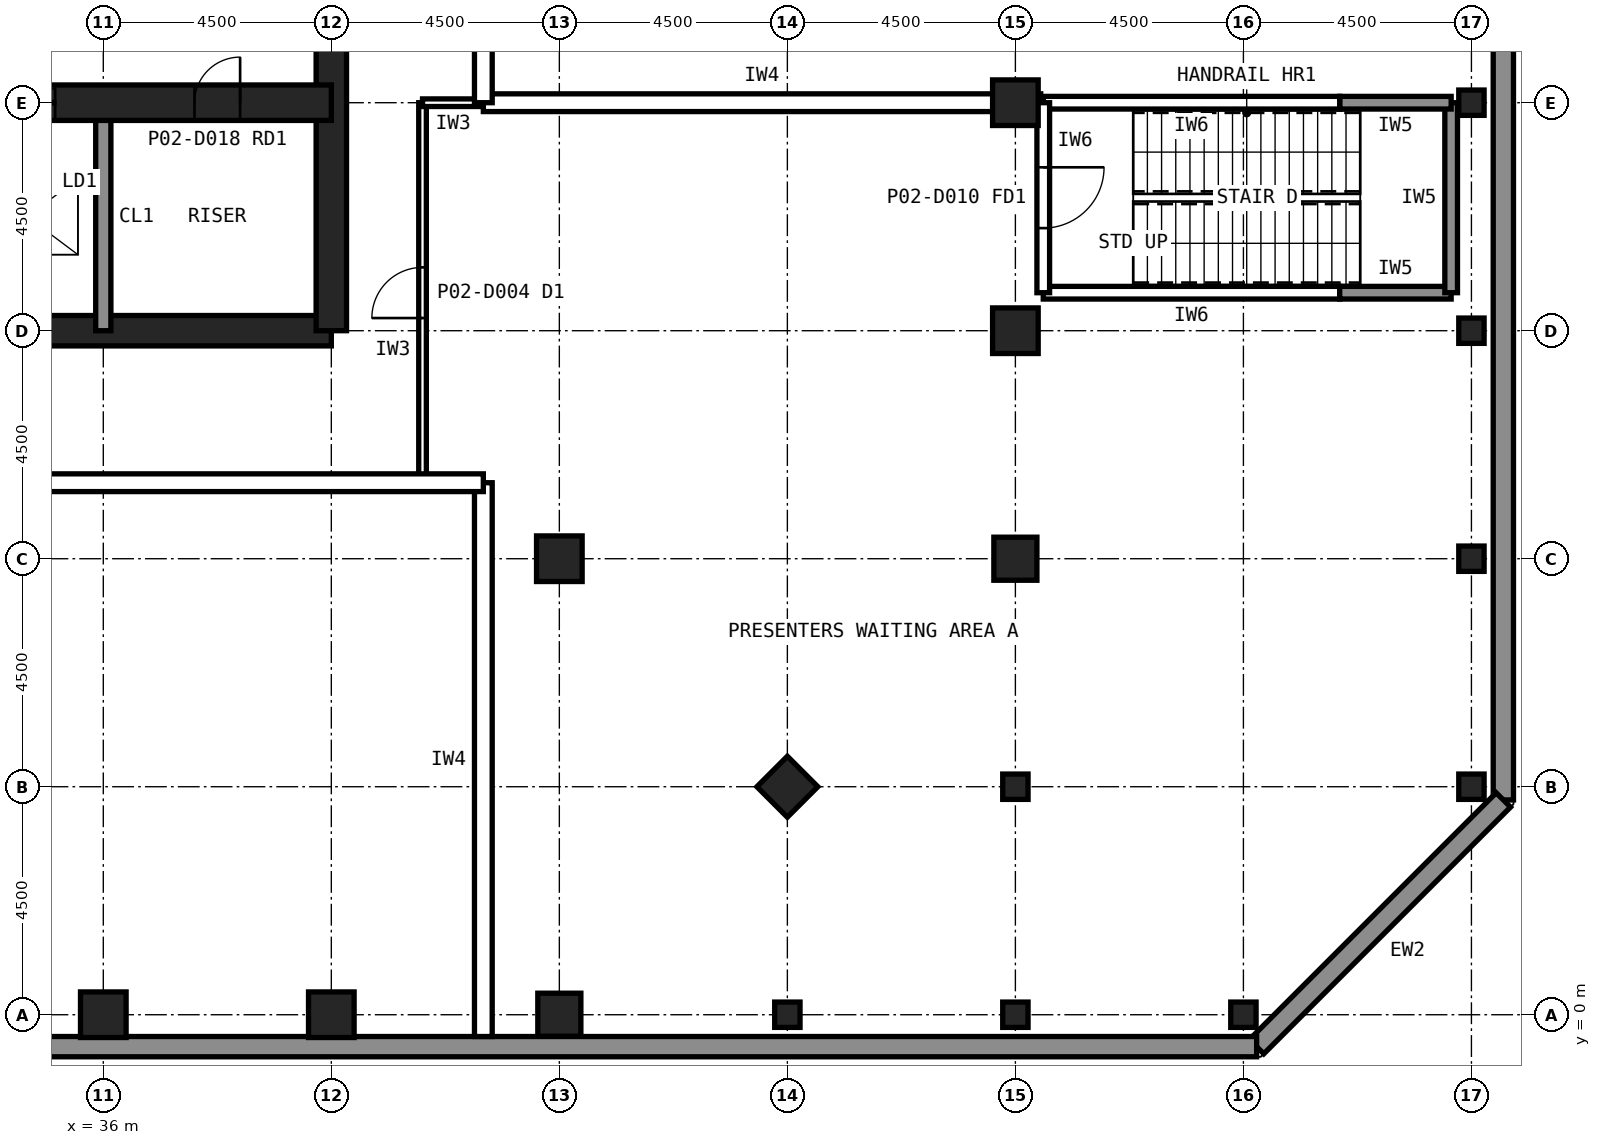
"""IFC4 building model, lengths in metres.
Left out: names, types, materials, properties, quantities, classifications, styles, units other than length and angle.
Written with IfcOpenShell. Run it as: python <this file> out.ifc"""

import sys

from ifc_helpers import new_model, si_unit, direction, frame, frame_2d, origin, origin_2d, place, context, subcontext, project, spatial, rectangle, hollow_rectangle, extrude, element, fill, save


model = new_model("IFC4")
c1 = context("Model", 3, precision=1e-05, world=origin(), true_north=direction((0.0, 1.0)))
c2 = subcontext(c1, "Body", "Model", "MODEL_VIEW")
j1 = project(units=[si_unit("LENGTHUNIT", "METRE"), si_unit("PLANEANGLEUNIT", "RADIAN")], contexts=[c1])
p1 = place(None, origin())
s1 = spatial("IfcSite", under=j1, at=p1, CompositionType="ELEMENT")
p2 = place(p1, origin())
s2 = spatial("IfcBuilding", under=s1, at=p2, CompositionType="ELEMENT")
p3 = place(p2, frame((0.0, 0.0, 6.0)))
s3 = spatial("IfcBuildingStorey", under=s2, at=p3, CompositionType="ELEMENT", Elevation=6.0)
for number, where, z_axis, x_axis in (
    (1, (36.0, 0.0, 0.0), (0.0, 0.0, 1.0), (1.0, 0.0, 0.0)),
    (2, (40.5, 0.0, 0.0), (0.0, 0.0, 1.0), (1.0, 0.0, 0.0)),
):
    element("IfcColumn", number, at=place(p3, frame(where, z_axis=z_axis, x_axis=x_axis)), inside=s3, PredefinedType="COLUMN", context=c2, shape_type="SweptSolid", body=[
        extrude(hollow_rectangle(XDim=0.9, YDim=0.9, WallThickness=0.063, at=origin_2d()), origin(), (0.0, 0.0, 1.0), 6.0),
    ])
for number, where, z_axis, x_axis in (
    (3, (45.0, 0.0, 0.0), (0.0, 0.0, 1.0), (1.0, 0.0, 0.0)),
    (4, (54.0, 9.0, 0.0), (0.0, 0.0, 1.0), (1.0, 0.0, 0.0)),
):
    element("IfcColumn", number, at=place(p3, frame(where, z_axis=z_axis, x_axis=x_axis)), inside=s3, PredefinedType="COLUMN", context=c2, shape_type="SweptSolid", body=[
        extrude(hollow_rectangle(XDim=0.85, YDim=0.85, WallThickness=0.05, at=origin_2d()), origin(), (0.0, 0.0, 1.0), 6.0),
    ])
for number, where, z_axis, x_axis in (
    (5, (54.0, 13.5, 0.0), (0.0, 0.0, 1.0), (1.0, 0.0, 0.0)),
    (6, (54.0, 18.0, 0.0), (0.0, 0.0, 1.0), (1.0, 0.0, 0.0)),
):
    element("IfcColumn", number, at=place(p3, frame(where, z_axis=z_axis, x_axis=x_axis)), inside=s3, PredefinedType="COLUMN", context=c2, shape_type="SweptSolid", body=[
        extrude(hollow_rectangle(XDim=0.9, YDim=0.9, WallThickness=0.063, at=origin_2d()), origin(), (0.0, 0.0, 1.0), 6.0),
    ])
p4 = place(p3, frame((49.5, 4.5, 0.0), z_axis=(0.0, 0.0, 1.0), x_axis=(0.707106781187, 0.707106781187, 0.0)))
e7 = element("IfcColumn", 7, at=p4, inside=s3, PredefinedType="COLUMN", context=c2, shape_type="SweptSolid", body=[
    extrude(hollow_rectangle(XDim=0.85, YDim=0.85, WallThickness=0.05, at=origin_2d()), origin(), (0.0, 0.0, 1.0), 6.0),
])
p5 = place(p3, frame((45.0, 9.0, 0.0), z_axis=(0.0, 0.0, 1.0), x_axis=(1.0, 0.0, 0.0)))
e8 = element("IfcColumn", 8, at=p5, inside=s3, PredefinedType="COLUMN", context=c2, shape_type="SweptSolid", body=[
    extrude(hollow_rectangle(XDim=0.9, YDim=0.9, WallThickness=0.063, at=origin_2d()), origin(), (0.0, 0.0, 1.0), 6.0),
])
for number, where, z_axis, x_axis in (
    (9, (63.0, 4.5, 0.0), (0.0, 0.0, 1.0), (1.0, 0.0, 0.0)),
    (10, (63.0, 9.0, 0.0), (0.0, 0.0, 1.0), (1.0, 0.0, 0.0)),
    (11, (63.0, 13.5, 0.0), (0.0, 0.0, 1.0), (1.0, 0.0, 0.0)),
    (12, (63.0, 18.0, 0.0), (0.0, 0.0, 1.0), (1.0, 0.0, 0.0)),
    (13, (58.5, 0.0, 0.0), (0.0, 0.0, 1.0), (1.0, 0.0, 0.0)),
    (14, (54.0, 0.0, 0.0), (0.0, 0.0, 1.0), (1.0, 0.0, 0.0)),
    (15, (49.5, 0.0, 0.0), (0.0, 0.0, 1.0), (1.0, 0.0, 0.0)),
    (16, (54.0, 4.5, 0.0), (0.0, 0.0, 1.0), (1.0, 0.0, 0.0)),
):
    element("IfcColumn", number, at=place(p3, frame(where, z_axis=z_axis, x_axis=x_axis)), inside=s3, PredefinedType="COLUMN", context=c2, shape_type="SweptSolid", body=[
        extrude(hollow_rectangle(XDim=0.5, YDim=0.5, WallThickness=0.022, at=origin_2d()), origin(), (0.0, 0.0, 1.0), 6.0),
    ])
p6 = place(p3, frame((13.5, 13.5, 0.0), z_axis=(0.0, 0.0, 1.0), x_axis=(1.0, 0.0, 0.0)))
e17 = element("IfcWall", 17, at=p6, inside=s3, PredefinedType="SHEAR", context=c2, shape_type="SweptSolid", body=[
    extrude(rectangle(XDim=27.0, YDim=0.6, at=frame_2d((13.5, 0.0))), origin(), (0.0, 0.0, 1.0), 6.0),
])
p7 = place(p3, frame((40.5, 13.5, 0.0), z_axis=(0.0, 0.0, 1.0), x_axis=(0.0, 1.0, 0.0)))
e18 = element("IfcWall", 18, at=p7, inside=s3, PredefinedType="SHEAR", context=c2, shape_type="SweptSolid", body=[
    extrude(rectangle(XDim=27.0, YDim=0.6, at=frame_2d((13.5, 0.0))), origin(), (0.0, 0.0, 1.0), 6.0),
])
p8 = place(p7, frame((5.85, 0.0, 0.0)))
e19 = element("IfcOpeningElement", 19, at=p8, cuts=e18, PredefinedType="OPENING", context=c2, shape_type="SweptSolid", body=[
    extrude(rectangle(XDim=1.8, YDim=2.1, at=frame_2d((0.9, 1.05))), frame((0.0, 0.31, 0.0), z_axis=(0.0, -1.0, 0.0), x_axis=(1.0, 0.0, 0.0)), (0.0, 0.0, 1.0), 0.62),
])
p9 = place(p7, frame((19.65, 0.0, 0.0)))
e20 = element("IfcOpeningElement", 20, at=p9, cuts=e18, PredefinedType="OPENING", context=c2, shape_type="SweptSolid", body=[
    extrude(rectangle(XDim=1.2, YDim=2.1, at=frame_2d((0.6, 1.05))), frame((0.0, 0.31, 0.0), z_axis=(0.0, -1.0, 0.0), x_axis=(1.0, 0.0, 0.0)), (0.0, 0.0, 1.0), 0.62),
])
p10 = place(p3, frame((36.0, 13.5, 0.0), z_axis=(0.0, 0.0, 1.0), x_axis=(0.0, 1.0, 0.0)))
e21 = element("IfcWall", 21, at=p10, inside=s3, PredefinedType="SOLIDWALL", context=c2, shape_type="SweptSolid", body=[
    extrude(rectangle(XDim=4.5, YDim=0.3, at=frame_2d((2.25, 0.0))), origin(), (0.0, 0.0, 1.0), 5.8),
])
p11 = place(p3, frame((13.5, 18.0, 0.0), z_axis=(0.0, 0.0, 1.0), x_axis=(1.0, 0.0, 0.0)))
e22 = element("IfcWall", 22, at=p11, inside=s3, PredefinedType="SHEAR", context=c2, shape_type="SweptSolid", body=[
    extrude(rectangle(XDim=27.0, YDim=0.7, at=frame_2d((13.5, 0.0))), origin(), (0.0, 0.0, 1.0), 6.0),
])
p12 = place(p11, frame((24.3, 0.0, 0.0)))
e23 = element("IfcOpeningElement", 23, at=p12, cuts=e22, PredefinedType="OPENING", context=c2, shape_type="SweptSolid", body=[
    extrude(rectangle(XDim=0.9, YDim=2.1, at=frame_2d((0.45, 1.05))), frame((0.0, 0.36, 0.0), z_axis=(0.0, -1.0, 0.0), x_axis=(1.0, 0.0, 0.0)), (0.0, 0.0, 1.0), 0.72),
])
p13 = place(p11, frame((5.45, 0.0, 0.0)))
e24 = element("IfcOpeningElement", 24, at=p13, cuts=e22, PredefinedType="OPENING", context=c2, shape_type="SweptSolid", body=[
    extrude(rectangle(XDim=1.1, YDim=2.1, at=frame_2d((0.55, 1.05))), frame((0.0, 0.36, 0.0), z_axis=(0.0, -1.0, 0.0), x_axis=(1.0, 0.0, 0.0)), (0.0, 0.0, 1.0), 0.72),
])
p14 = place(p11, frame((8.45, 0.0, 0.0)))
e25 = element("IfcOpeningElement", 25, at=p14, cuts=e22, PredefinedType="OPENING", context=c2, shape_type="SweptSolid", body=[
    extrude(rectangle(XDim=1.1, YDim=2.1, at=frame_2d((0.55, 1.05))), frame((0.0, 0.36, 0.0), z_axis=(0.0, -1.0, 0.0), x_axis=(1.0, 0.0, 0.0)), (0.0, 0.0, 1.0), 0.72),
])
p15 = place(p11, frame((11.45, 0.0, 0.0)))
e26 = element("IfcOpeningElement", 26, at=p15, cuts=e22, PredefinedType="OPENING", context=c2, shape_type="SweptSolid", body=[
    extrude(rectangle(XDim=1.1, YDim=2.1, at=frame_2d((0.55, 1.05))), frame((0.0, 0.36, 0.0), z_axis=(0.0, -1.0, 0.0), x_axis=(1.0, 0.0, 0.0)), (0.0, 0.0, 1.0), 0.72),
])
p16 = place(p11, frame((14.45, 0.0, 0.0)))
e27 = element("IfcOpeningElement", 27, at=p16, cuts=e22, PredefinedType="OPENING", context=c2, shape_type="SweptSolid", body=[
    extrude(rectangle(XDim=1.1, YDim=2.1, at=frame_2d((0.55, 1.05))), frame((0.0, 0.36, 0.0), z_axis=(0.0, -1.0, 0.0), x_axis=(1.0, 0.0, 0.0)), (0.0, 0.0, 1.0), 0.72),
])
p17 = place(p11, frame((17.45, 0.0, 0.0)))
e28 = element("IfcOpeningElement", 28, at=p17, cuts=e22, PredefinedType="OPENING", context=c2, shape_type="SweptSolid", body=[
    extrude(rectangle(XDim=1.1, YDim=2.1, at=frame_2d((0.55, 1.05))), frame((0.0, 0.36, 0.0), z_axis=(0.0, -1.0, 0.0), x_axis=(1.0, 0.0, 0.0)), (0.0, 0.0, 1.0), 0.72),
])
p18 = place(p11, frame((20.45, 0.0, 0.0)))
e29 = element("IfcOpeningElement", 29, at=p18, cuts=e22, PredefinedType="OPENING", context=c2, shape_type="SweptSolid", body=[
    extrude(rectangle(XDim=1.1, YDim=2.1, at=frame_2d((0.55, 1.05))), frame((0.0, 0.36, 0.0), z_axis=(0.0, -1.0, 0.0), x_axis=(1.0, 0.0, 0.0)), (0.0, 0.0, 1.0), 0.72),
])
p19 = place(p11, frame((1.6, 0.0, 0.0)))
e30 = element("IfcOpeningElement", 30, at=p19, cuts=e22, PredefinedType="OPENING", context=c2, shape_type="SweptSolid", body=[
    extrude(rectangle(XDim=1.3, YDim=2.2, at=frame_2d((0.65, 1.1))), frame((0.0, 0.36, 0.0), z_axis=(0.0, -1.0, 0.0), x_axis=(1.0, 0.0, 0.0)), (0.0, 0.0, 1.0), 0.72),
])
p20 = place(p3, frame((63.63, 49.761, 0.0), z_axis=(0.0, 0.0, 1.0), x_axis=(0.0, -1.0, 0.0)))
e31 = element("IfcWall", 31, at=p20, inside=s3, PredefinedType="SOLIDWALL", context=c2, shape_type="SweptSolid", body=[
    extrude(rectangle(XDim=45.522, YDim=0.4, at=frame_2d((22.761, 0.0))), origin(), (0.0, 0.0, 1.0), 6.0),
])
p21 = place(p3, frame((63.63, 4.239, 0.0), z_axis=(0.0, 0.0, 1.0), x_axis=(-0.707106781187, -0.707106781187, 0.0)))
e32 = element("IfcWall", 32, at=p21, inside=s3, PredefinedType="SOLIDWALL", context=c2, shape_type="SweptSolid", body=[
    extrude(rectangle(XDim=6.886, YDim=0.4, at=frame_2d((3.443, 0.0))), origin(), (0.0, 0.0, 1.0), 6.0),
])
p22 = place(p3, frame((58.761, -0.63, 0.0), z_axis=(0.0, 0.0, 1.0), x_axis=(-1.0, 0.0, 0.0)))
e33 = element("IfcWall", 33, at=p22, inside=s3, PredefinedType="SOLIDWALL", context=c2, shape_type="SweptSolid", body=[
    extrude(rectangle(XDim=63.522, YDim=0.4, at=frame_2d((31.761, 0.0))), origin(), (0.0, 0.0, 1.0), 6.0),
])
p23 = place(p3, frame((42.3, 10.5, 0.0), z_axis=(0.0, 0.0, 1.0), x_axis=(0.0, 1.0, 0.0)))
e34 = element("IfcWall", 34, at=p23, inside=s3, PredefinedType="PARTITIONING", context=c2, shape_type="SweptSolid", body=[
    extrude(rectangle(XDim=7.5, YDim=0.15, at=frame_2d((3.75, 0.0))), origin(), (0.0, 0.0, 1.0), 5.8),
])
p24 = place(p23, frame((3.25, 0.0, 0.0)))
e35 = element("IfcOpeningElement", 35, at=p24, cuts=e34, PredefinedType="OPENING", context=c2, shape_type="SweptSolid", body=[
    extrude(rectangle(XDim=1.0, YDim=2.1, at=frame_2d((0.5, 1.05))), frame((0.0, 0.085, 0.0), z_axis=(0.0, -1.0, 0.0), x_axis=(1.0, 0.0, 0.0)), (0.0, 0.0, 1.0), 0.17),
])
p25 = place(p3, frame((42.3, 18.0, 0.0), z_axis=(0.0, 0.0, 1.0), x_axis=(1.0, 0.0, 0.0)))
e36 = element("IfcWall", 36, at=p25, inside=s3, PredefinedType="PARTITIONING", context=c2, shape_type="SweptSolid", body=[
    extrude(rectangle(XDim=1.21, YDim=0.15, at=frame_2d((0.605, 0.0))), origin(), (0.0, 0.0, 1.0), 4.881),
])
p26 = place(p3, frame((43.5, -0.43, 0.0), z_axis=(0.0, 0.0, 1.0), x_axis=(0.0, 1.0, 0.0)))
e37 = element("IfcWall", 37, at=p26, inside=s3, PredefinedType="PARTITIONING", context=c2, shape_type="SweptSolid", body=[
    extrude(rectangle(XDim=10.93, YDim=0.35, at=frame_2d((5.465, 0.0))), origin(), (0.0, 0.0, 1.0), 5.8),
])
p27 = place(p3, frame((43.5, 10.5, 0.0), z_axis=(0.0, 0.0, 1.0), x_axis=(-1.0, 0.0, 0.0)))
e38 = element("IfcWall", 38, at=p27, inside=s3, PredefinedType="PARTITIONING", context=c2, shape_type="SweptSolid", body=[
    extrude(rectangle(XDim=33.0, YDim=0.35, at=frame_2d((16.5, 0.0))), origin(), (0.0, 0.0, 1.0), 5.8),
])
p28 = place(p27, frame((15.3, 0.0, 0.0)))
e39 = element("IfcOpeningElement", 39, at=p28, cuts=e38, PredefinedType="OPENING", context=c2, shape_type="SweptSolid", body=[
    extrude(rectangle(XDim=2.4, YDim=3.0, at=frame_2d((1.2, 1.5))), frame((0.0, 0.185, 0.0), z_axis=(0.0, -1.0, 0.0), x_axis=(1.0, 0.0, 0.0)), (0.0, 0.0, 1.0), 0.37),
])
p29 = place(p3, frame((43.5, 18.0, 0.0), z_axis=(0.0, 0.0, 1.0), x_axis=(1.0, 0.0, 0.0)))
e40 = element("IfcWall", 40, at=p29, inside=s3, PredefinedType="PARTITIONING", context=c2, shape_type="SweptSolid", body=[
    extrude(rectangle(XDim=11.0, YDim=0.35, at=frame_2d((5.5, 0.0))), origin(), (0.0, 0.0, 1.0), 4.881),
])
p30 = place(p3, frame((43.5, 36.0, 0.0), z_axis=(0.0, 0.0, 1.0), x_axis=(0.0, -1.0, 0.0)))
e41 = element("IfcWall", 41, at=p30, inside=s3, PredefinedType="PARTITIONING", context=c2, shape_type="SweptSolid", body=[
    extrude(rectangle(XDim=18.0, YDim=0.35, at=frame_2d((9.0, 0.0))), origin(), (0.0, 0.0, 1.0), 5.8),
])
p31 = place(p30, frame((7.8, 0.0, 0.0)))
e42 = element("IfcOpeningElement", 42, at=p31, cuts=e41, PredefinedType="OPENING", context=c2, shape_type="SweptSolid", body=[
    extrude(rectangle(XDim=2.4, YDim=3.0, at=frame_2d((1.2, 1.5))), frame((0.0, 0.185, 0.0), z_axis=(0.0, -1.0, 0.0), x_axis=(1.0, 0.0, 0.0)), (0.0, 0.0, 1.0), 0.37),
])
p32 = place(p3, frame((54.55, 14.25, 0.0), z_axis=(0.0, 0.0, 1.0), x_axis=(1.0, 0.0, 0.0)))
e43 = element("IfcWall", 43, at=p32, inside=s3, PredefinedType="PARTITIONING", context=c2, shape_type="SweptSolid", body=[
    extrude(rectangle(XDim=5.85, YDim=0.25, at=frame_2d((2.925, 0.0))), origin(), (0.0, 0.0, 1.0), 5.8),
])
p33 = place(p3, frame((60.4, 14.25, 0.0), z_axis=(0.0, 0.0, 1.0), x_axis=(1.0, 0.0, 0.0)))
e44 = element("IfcWall", 44, at=p33, inside=s3, PredefinedType="SOLIDWALL", context=c2, shape_type="SweptSolid", body=[
    extrude(rectangle(XDim=2.2, YDim=0.25, at=frame_2d((1.1, 0.0))), origin(), (0.0, 0.0, 1.0), 6.0),
])
p34 = place(p3, frame((62.6, 14.25, 0.0), z_axis=(0.0, 0.0, 1.0), x_axis=(0.0, 1.0, 0.0)))
e45 = element("IfcWall", 45, at=p34, inside=s3, PredefinedType="SOLIDWALL", context=c2, shape_type="SweptSolid", body=[
    extrude(rectangle(XDim=3.75, YDim=0.25, at=frame_2d((1.875, 0.0))), origin(), (0.0, 0.0, 1.0), 6.0),
])
p35 = place(p3, frame((62.6, 18.0, 0.0), z_axis=(0.0, 0.0, 1.0), x_axis=(-1.0, 0.0, 0.0)))
e46 = element("IfcWall", 46, at=p35, inside=s3, PredefinedType="SOLIDWALL", context=c2, shape_type="SweptSolid", body=[
    extrude(rectangle(XDim=2.2, YDim=0.25, at=frame_2d((1.1, 0.0))), origin(), (0.0, 0.0, 1.0), 5.189),
])
p36 = place(p3, frame((60.4, 18.0, 0.0), z_axis=(0.0, 0.0, 1.0), x_axis=(-1.0, 0.0, 0.0)))
e47 = element("IfcWall", 47, at=p36, inside=s3, PredefinedType="PARTITIONING", context=c2, shape_type="SweptSolid", body=[
    extrude(rectangle(XDim=5.85, YDim=0.25, at=frame_2d((2.925, 0.0))), origin(), (0.0, 0.0, 1.0), 5.189),
])
p37 = place(p3, frame((54.55, 18.0, 0.0), z_axis=(0.0, 0.0, 1.0), x_axis=(0.0, -1.0, 0.0)))
e48 = element("IfcWall", 48, at=p37, inside=s3, PredefinedType="PARTITIONING", context=c2, shape_type="SweptSolid", body=[
    extrude(rectangle(XDim=3.75, YDim=0.25, at=frame_2d((1.875, 0.0))), origin(), (0.0, 0.0, 1.0), 5.8),
])
p38 = place(p37, frame((1.275, 0.0, 0.0)))
e49 = element("IfcOpeningElement", 49, at=p38, cuts=e48, PredefinedType="OPENING", context=c2, shape_type="SweptSolid", body=[
    extrude(rectangle(XDim=1.2, YDim=2.1, at=frame_2d((0.6, 1.05))), frame((0.0, 0.135, 0.0), z_axis=(0.0, -1.0, 0.0), x_axis=(1.0, 0.0, 0.0)), (0.0, 0.0, 1.0), 0.27),
])
p39 = place(p12, origin())
e50 = element("IfcDoor", 50, at=p39, inside=s3, OperationType="SINGLE_SWING_RIGHT", PredefinedType="DOOR", context=c2, shape_type="SweptSolid", body=[
    extrude(rectangle(XDim=0.9, YDim=2.1, at=frame_2d((0.45, 1.05))), frame((0.0, 0.025, 0.0), z_axis=(0.0, -1.0, 0.0), x_axis=(1.0, 0.0, 0.0)), (0.0, 0.0, 1.0), 0.05),
])
fill(e23, e50)
p40 = place(p18, origin())
e51 = element("IfcDoor", 51, at=p40, inside=s3, OperationType="SLIDING_TO_LEFT", PredefinedType="DOOR", context=c2, shape_type="SweptSolid", body=[
    extrude(rectangle(XDim=1.1, YDim=2.1, at=frame_2d((0.55, 1.05))), frame((0.0, 0.025, 0.0), z_axis=(0.0, -1.0, 0.0), x_axis=(1.0, 0.0, 0.0)), (0.0, 0.0, 1.0), 0.05),
])
fill(e29, e51)
p41 = place(p24, origin())
e52 = element("IfcDoor", 52, at=p41, inside=s3, OperationType="SINGLE_SWING_LEFT", PredefinedType="DOOR", context=c2, shape_type="SweptSolid", body=[
    extrude(rectangle(XDim=1.0, YDim=2.1, at=frame_2d((0.5, 1.05))), frame((0.0, 0.025, 0.0), z_axis=(0.0, -1.0, 0.0), x_axis=(1.0, 0.0, 0.0)), (0.0, 0.0, 1.0), 0.05),
])
fill(e35, e52)
p42 = place(p38, origin())
e53 = element("IfcDoor", 53, at=p42, inside=s3, OperationType="SINGLE_SWING_LEFT", PredefinedType="DOOR", context=c2, shape_type="SweptSolid", body=[
    extrude(rectangle(XDim=1.2, YDim=2.1, at=frame_2d((0.6, 1.05))), frame((0.0, 0.025, 0.0), z_axis=(0.0, -1.0, 0.0), x_axis=(1.0, 0.0, 0.0)), (0.0, 0.0, 1.0), 0.05),
])
fill(e49, e53)
save(model, sys.argv[1])
